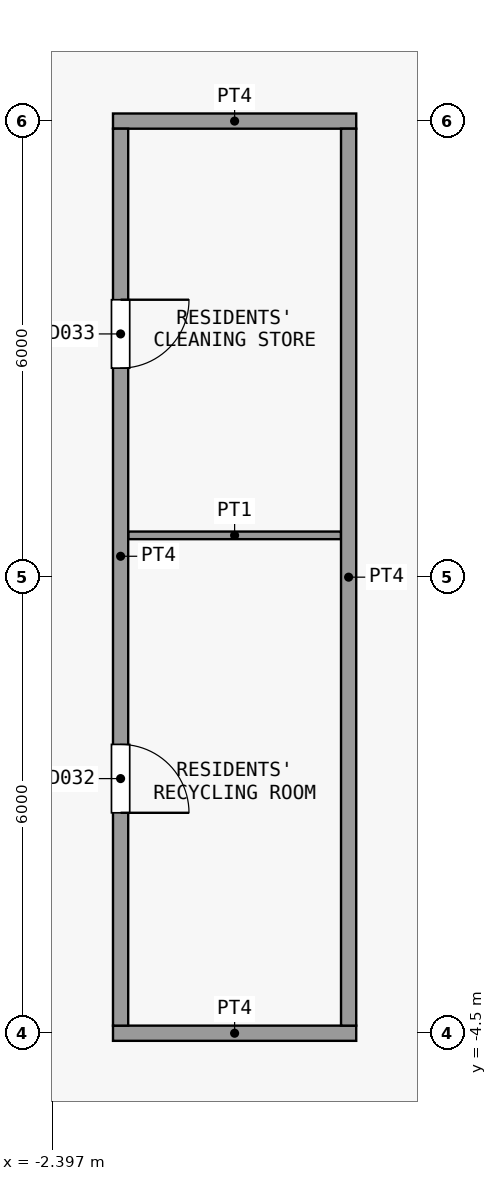
"""IFC4 building model, lengths in metres.
Left out: names, types, materials, properties, quantities, classifications, styles, units other than length and angle.
Written with IfcOpenShell. Run it as: python <this file> out.ifc"""

import sys

from ifc_helpers import new_model, si_unit, direction, frame, frame_2d, origin, place, context, subcontext, project, spatial, rectangle, extrude, element, fill, save


model = new_model("IFC4")
c1 = context("Model", 3, precision=1e-05, world=origin(), true_north=direction((0.0, 1.0)))
c2 = subcontext(c1, "Body", "Model", "MODEL_VIEW")
j1 = project(units=[si_unit("LENGTHUNIT", "METRE"), si_unit("PLANEANGLEUNIT", "RADIAN")], contexts=[c1])
p1 = place(None, origin())
s1 = spatial("IfcSite", under=j1, at=p1, CompositionType="ELEMENT")
p2 = place(p1, origin())
s2 = spatial("IfcBuilding", under=s1, at=p2, CompositionType="ELEMENT")
p3 = place(p2, frame((0.0, 0.0, 174.5)))
s3 = spatial("IfcBuildingStorey", under=s2, at=p3, CompositionType="ELEMENT", Elevation=174.5)
p4 = place(p3, frame((-1.6, -4.5, 0.0), z_axis=(0.0, 0.0, 1.0), x_axis=(1.0, 0.0, 0.0)))
e1 = element("IfcWall", 1, at=p4, inside=s3, PredefinedType="PARTITIONING", context=c2, shape_type="SweptSolid", body=[
    extrude(rectangle(XDim=3.2, YDim=0.2, at=frame_2d((1.6, 0.0))), origin(), (0.0, 0.0, 1.0), 3.3),
])
p5 = place(p3, frame((-1.4, 2.05, 0.0), z_axis=(0.0, 0.0, 1.0), x_axis=(1.0, 0.0, 0.0)))
e2 = element("IfcWall", 2, at=p5, inside=s3, PredefinedType="PARTITIONING", context=c2, shape_type="SweptSolid", body=[
    extrude(rectangle(XDim=2.8, YDim=0.1, at=frame_2d((1.4, 0.0))), origin(), (0.0, 0.0, 1.0), 3.3),
])
p6 = place(p3, frame((-1.6, 7.5, 0.0), z_axis=(0.0, 0.0, 1.0), x_axis=(1.0, 0.0, 0.0)))
e3 = element("IfcWall", 3, at=p6, inside=s3, PredefinedType="PARTITIONING", context=c2, shape_type="SweptSolid", body=[
    extrude(rectangle(XDim=3.2, YDim=0.2, at=frame_2d((1.6, 0.0))), origin(), (0.0, 0.0, 1.0), 3.3),
])
p7 = place(p3, frame((-1.5, -4.4, 0.0), z_axis=(0.0, 0.0, 1.0), x_axis=(0.0, 1.0, 0.0)))
e4 = element("IfcWall", 4, at=p7, inside=s3, PredefinedType="PARTITIONING", context=c2, shape_type="SweptSolid", body=[
    extrude(rectangle(XDim=11.8, YDim=0.2, at=frame_2d((5.9, 0.0))), origin(), (0.0, 0.0, 1.0), 3.3),
])
p8 = place(p7, frame((2.8, 0.0, 0.0)))
e5 = element("IfcOpeningElement", 5, at=p8, cuts=e4, PredefinedType="OPENING", context=c2, shape_type="SweptSolid", body=[
    extrude(rectangle(XDim=0.9, YDim=2.1, at=frame_2d((0.45, 1.05))), frame((0.0, 0.11, 0.0), z_axis=(0.0, -1.0, 0.0), x_axis=(1.0, 0.0, 0.0)), (0.0, 0.0, 1.0), 0.22),
])
p9 = place(p7, frame((8.65, 0.0, 0.0)))
e6 = element("IfcOpeningElement", 6, at=p9, cuts=e4, PredefinedType="OPENING", context=c2, shape_type="SweptSolid", body=[
    extrude(rectangle(XDim=0.9, YDim=2.1, at=frame_2d((0.45, 1.05))), frame((0.0, 0.11, 0.0), z_axis=(0.0, -1.0, 0.0), x_axis=(1.0, 0.0, 0.0)), (0.0, 0.0, 1.0), 0.22),
])
p10 = place(p3, frame((1.5, -4.4, 0.0), z_axis=(0.0, 0.0, 1.0), x_axis=(0.0, 1.0, 0.0)))
e7 = element("IfcWall", 7, at=p10, inside=s3, PredefinedType="PARTITIONING", context=c2, shape_type="SweptSolid", body=[
    extrude(rectangle(XDim=11.8, YDim=0.2, at=frame_2d((5.9, 0.0))), origin(), (0.0, 0.0, 1.0), 3.3),
])
p11 = place(p8, origin())
e8 = element("IfcDoor", 8, at=p11, inside=s3, OperationType="SINGLE_SWING_LEFT", PredefinedType="DOOR", context=c2, shape_type="SweptSolid", body=[
    extrude(rectangle(XDim=0.9, YDim=2.1, at=frame_2d((0.45, 1.05))), frame((0.0, 0.025, 0.0), z_axis=(0.0, -1.0, 0.0), x_axis=(1.0, 0.0, 0.0)), (0.0, 0.0, 1.0), 0.05),
])
fill(e5, e8)
p12 = place(p9, origin())
e9 = element("IfcDoor", 9, at=p12, inside=s3, OperationType="SINGLE_SWING_RIGHT", PredefinedType="DOOR", context=c2, shape_type="SweptSolid", body=[
    extrude(rectangle(XDim=0.9, YDim=2.1, at=frame_2d((0.45, 1.05))), frame((0.0, 0.025, 0.0), z_axis=(0.0, -1.0, 0.0), x_axis=(1.0, 0.0, 0.0)), (0.0, 0.0, 1.0), 0.05),
])
fill(e6, e9)
save(model, sys.argv[1])
